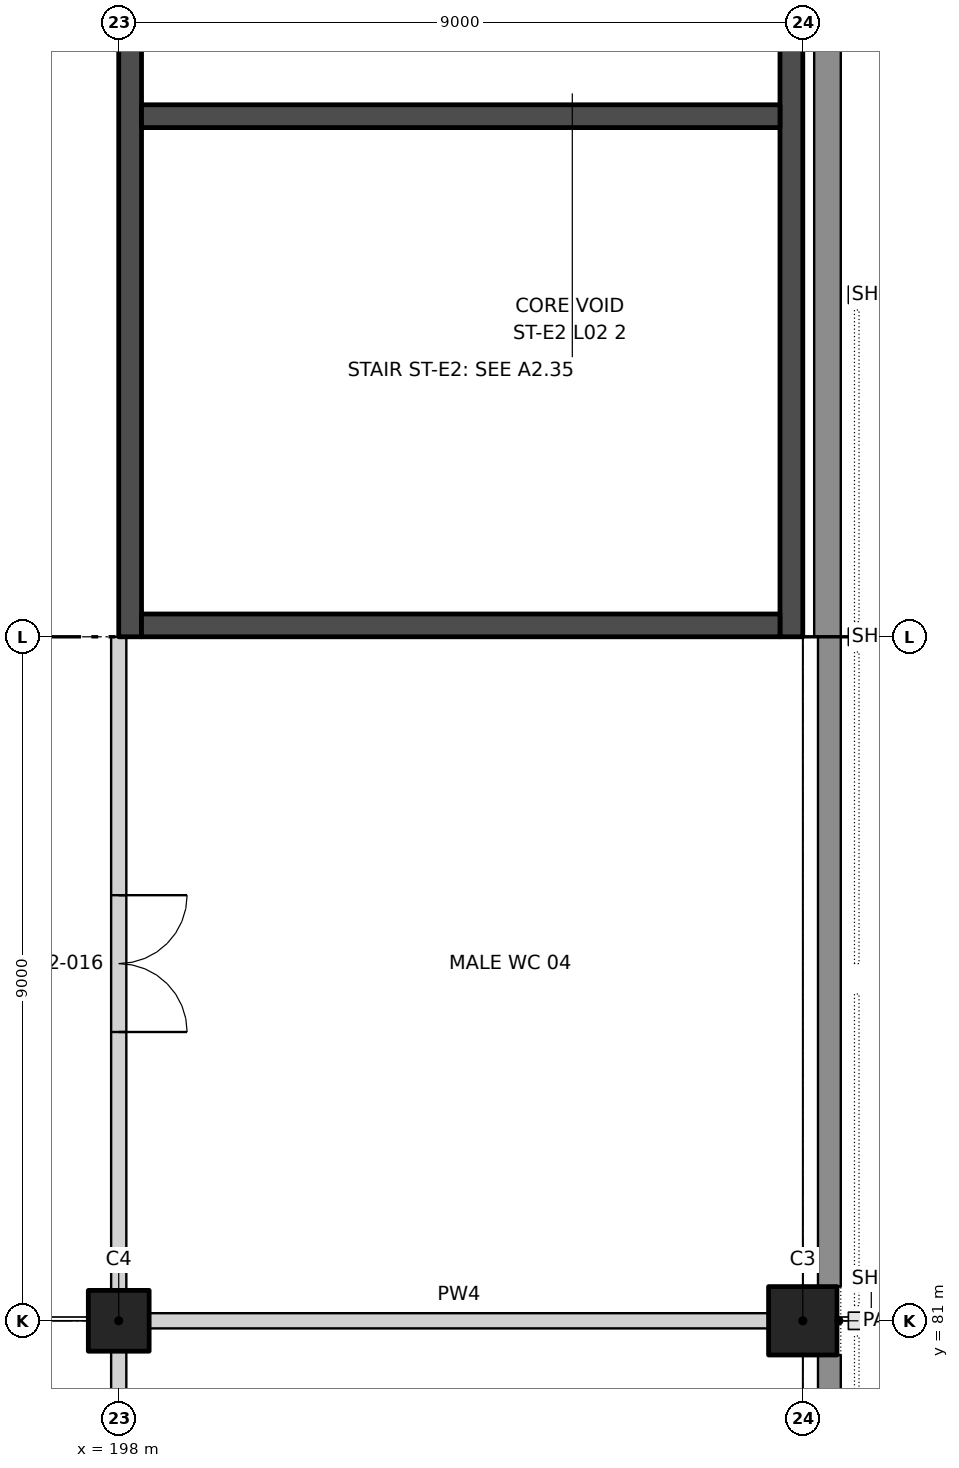
"""IFC4 building model, lengths in metres.
Left out: names, types, materials, properties, quantities, classifications, styles, units other than length and angle.
Written with IfcOpenShell. Run it as: python <this file> out.ifc"""

import sys

from ifc_helpers import new_model, si_unit, direction, frame, frame_2d, origin, origin_2d, place, context, subcontext, project, spatial, rectangle, extrude, element, fill, save


model = new_model("IFC4")
c1 = context("Model", 3, precision=1e-05, world=origin(), true_north=direction((0.0, 1.0)))
c2 = subcontext(c1, "Body", "Model", "MODEL_VIEW")
j1 = project(units=[si_unit("LENGTHUNIT", "METRE"), si_unit("PLANEANGLEUNIT", "RADIAN")], contexts=[c1])
p1 = place(None, origin())
s1 = spatial("IfcSite", under=j1, at=p1, CompositionType="ELEMENT")
p2 = place(p1, origin())
s2 = spatial("IfcBuilding", under=s1, at=p2, CompositionType="ELEMENT")
p3 = place(p2, frame((0.0, 0.0, 11.5)))
s3 = spatial("IfcBuildingStorey", under=s2, at=p3, CompositionType="ELEMENT", Elevation=11.5)
p4 = place(p3, frame((207.0, 81.0, 0.0), z_axis=(0.0, 0.0, 1.0), x_axis=(1.0, 0.0, 0.0)))
e1 = element("IfcColumn", 1, at=p4, inside=s3, PredefinedType="COLUMN", context=c2, shape_type="SweptSolid", body=[
    extrude(rectangle(XDim=0.9, YDim=0.9, at=origin_2d()), origin(), (0.0, 0.0, 1.0), 10.5),
])
p5 = place(p3, frame((198.0, 81.0, 0.0), z_axis=(0.0, 0.0, 1.0), x_axis=(1.0, 0.0, 0.0)))
e2 = element("IfcColumn", 2, at=p5, inside=s3, PredefinedType="COLUMN", context=c2, shape_type="SweptSolid", body=[
    extrude(rectangle(XDim=0.8, YDim=0.8, at=origin_2d()), origin(), (0.0, 0.0, 1.0), 10.5),
])
p6 = place(p3, frame((198.4, 81.0, 0.0), z_axis=(0.0, 0.0, 1.0), x_axis=(1.0, 0.0, 0.0)))
e3 = element("IfcWall", 3, at=p6, inside=s3, PredefinedType="PARTITIONING", context=c2, shape_type="SweptSolid", body=[
    extrude(rectangle(XDim=8.15, YDim=0.2, at=frame_2d((4.075, 0.0))), origin(), (0.0, 0.0, 1.0), 9.25),
])
p7 = place(p3, frame((198.0, 72.0, 0.0), z_axis=(0.0, 0.0, 1.0), x_axis=(0.0, 1.0, 0.0)))
e4 = element("IfcWall", 4, at=p7, inside=s3, PredefinedType="PARTITIONING", context=c2, shape_type="SweptSolid", body=[
    extrude(rectangle(XDim=8.6, YDim=0.2, at=frame_2d((4.3, 0.0))), origin(), (0.0, 0.0, 1.0), 9.15),
])
p8 = place(p7, frame((3.4, 0.0, 0.0)))
e5 = element("IfcOpeningElement", 5, at=p8, cuts=e4, PredefinedType="OPENING", context=c2, shape_type="SweptSolid", body=[
    extrude(rectangle(XDim=1.8, YDim=2.1, at=frame_2d((0.9, 1.05))), frame((0.0, 0.11, 0.0), z_axis=(0.0, -1.0, 0.0), x_axis=(1.0, 0.0, 0.0)), (0.0, 0.0, 1.0), 0.22),
])
p9 = place(p3, frame((198.0, 81.4, 0.0), z_axis=(0.0, 0.0, 1.0), x_axis=(0.0, 1.0, 0.0)))
e6 = element("IfcWall", 6, at=p9, inside=s3, PredefinedType="PARTITIONING", context=c2, shape_type="SweptSolid", body=[
    extrude(rectangle(XDim=8.6, YDim=0.2, at=frame_2d((4.3, 0.0))), origin(), (0.0, 0.0, 1.0), 9.15),
])
p10 = place(p9, frame((3.4, 0.0, 0.0)))
e7 = element("IfcOpeningElement", 7, at=p10, cuts=e6, PredefinedType="OPENING", context=c2, shape_type="SweptSolid", body=[
    extrude(rectangle(XDim=1.8, YDim=2.1, at=frame_2d((0.9, 1.05))), frame((0.0, 0.11, 0.0), z_axis=(0.0, -1.0, 0.0), x_axis=(1.0, 0.0, 0.0)), (0.0, 0.0, 1.0), 0.22),
])
for number, where, z_axis, x_axis in (
    (8, (207.35, 72.0, 0.0), (0.0, 0.0, 1.0), (0.0, 1.0, 0.0)),
    (9, (207.35, 81.45, 0.0), (0.0, 0.0, 1.0), (0.0, 1.0, 0.0)),
):
    element("IfcWall", number, at=place(p3, frame(where, z_axis=z_axis, x_axis=x_axis)), inside=s3, PredefinedType="SOLIDWALL", context=c2, shape_type="SweptSolid", body=[
        extrude(rectangle(XDim=8.55, YDim=0.3, at=frame_2d((4.275, 0.0))), origin(), (0.0, 0.0, 1.0), 10.5),
    ])
p11 = place(p3, frame((207.325, 90.0, 0.0), z_axis=(0.0, 0.0, 1.0), x_axis=(0.0, 1.0, 0.0)))
e10 = element("IfcWall", 10, at=p11, inside=s3, PredefinedType="SOLIDWALL", context=c2, shape_type="SweptSolid", body=[
    extrude(rectangle(XDim=9.0, YDim=0.35, at=frame_2d((4.5, 0.0))), origin(), (0.0, 0.0, 1.0), 10.5),
])
p12 = place(p3, frame((198.15, 108.0, 0.0), z_axis=(0.0, 0.0, 1.0), x_axis=(0.0, -1.0, 0.0)))
e11 = element("IfcWall", 11, at=p12, inside=s3, PredefinedType="SHEAR", context=c2, shape_type="SweptSolid", body=[
    extrude(rectangle(XDim=18.0, YDim=0.3, at=frame_2d((9.0, 0.0))), origin(), (0.0, 0.0, 1.0), 10.5),
])
p13 = place(p12, frame((1.5, 0.0, 0.0)))
e12 = element("IfcOpeningElement", 12, at=p13, cuts=e11, PredefinedType="OPENING", context=c2, shape_type="SweptSolid", body=[
    extrude(rectangle(XDim=1.2, YDim=2.1, at=frame_2d((0.6, 1.05))), frame((0.0, 0.16, 0.0), z_axis=(0.0, -1.0, 0.0), x_axis=(1.0, 0.0, 0.0)), (0.0, 0.0, 1.0), 0.32),
])
p14 = place(p3, frame((206.85, 108.0, 0.0), z_axis=(0.0, 0.0, 1.0), x_axis=(0.0, -1.0, 0.0)))
e13 = element("IfcWall", 13, at=p14, inside=s3, PredefinedType="SHEAR", context=c2, shape_type="SweptSolid", body=[
    extrude(rectangle(XDim=18.0, YDim=0.3, at=frame_2d((9.0, 0.0))), origin(), (0.0, 0.0, 1.0), 10.5),
])
for number, where, z_axis, x_axis in (
    (14, (198.3, 90.15, 0.0), (0.0, 0.0, 1.0), (1.0, 0.0, 0.0)),
    (15, (198.3, 96.85, 0.0), (0.0, 0.0, 1.0), (1.0, 0.0, 0.0)),
):
    element("IfcWall", number, at=place(p3, frame(where, z_axis=z_axis, x_axis=x_axis)), inside=s3, PredefinedType="SHEAR", context=c2, shape_type="SweptSolid", body=[
        extrude(rectangle(XDim=8.4, YDim=0.3, at=frame_2d((4.2, 0.0))), origin(), (0.0, 0.0, 1.0), 10.5),
    ])
p15 = place(p10, frame((1.8, 0.0, 0.0), z_axis=(0.0, 0.0, 1.0), x_axis=(-1.0, 0.0, 0.0)))
e16 = element("IfcDoor", 16, at=p15, inside=s3, OperationType="DOUBLE_DOOR_DOUBLE_SWING", PredefinedType="DOOR", context=c2, shape_type="SweptSolid", body=[
    extrude(rectangle(XDim=1.8, YDim=2.1, at=frame_2d((0.9, 1.05))), frame((0.0, 0.025, 0.0), z_axis=(0.0, -1.0, 0.0), x_axis=(1.0, 0.0, 0.0)), (0.0, 0.0, 1.0), 0.05),
])
fill(e7, e16)
save(model, sys.argv[1])
